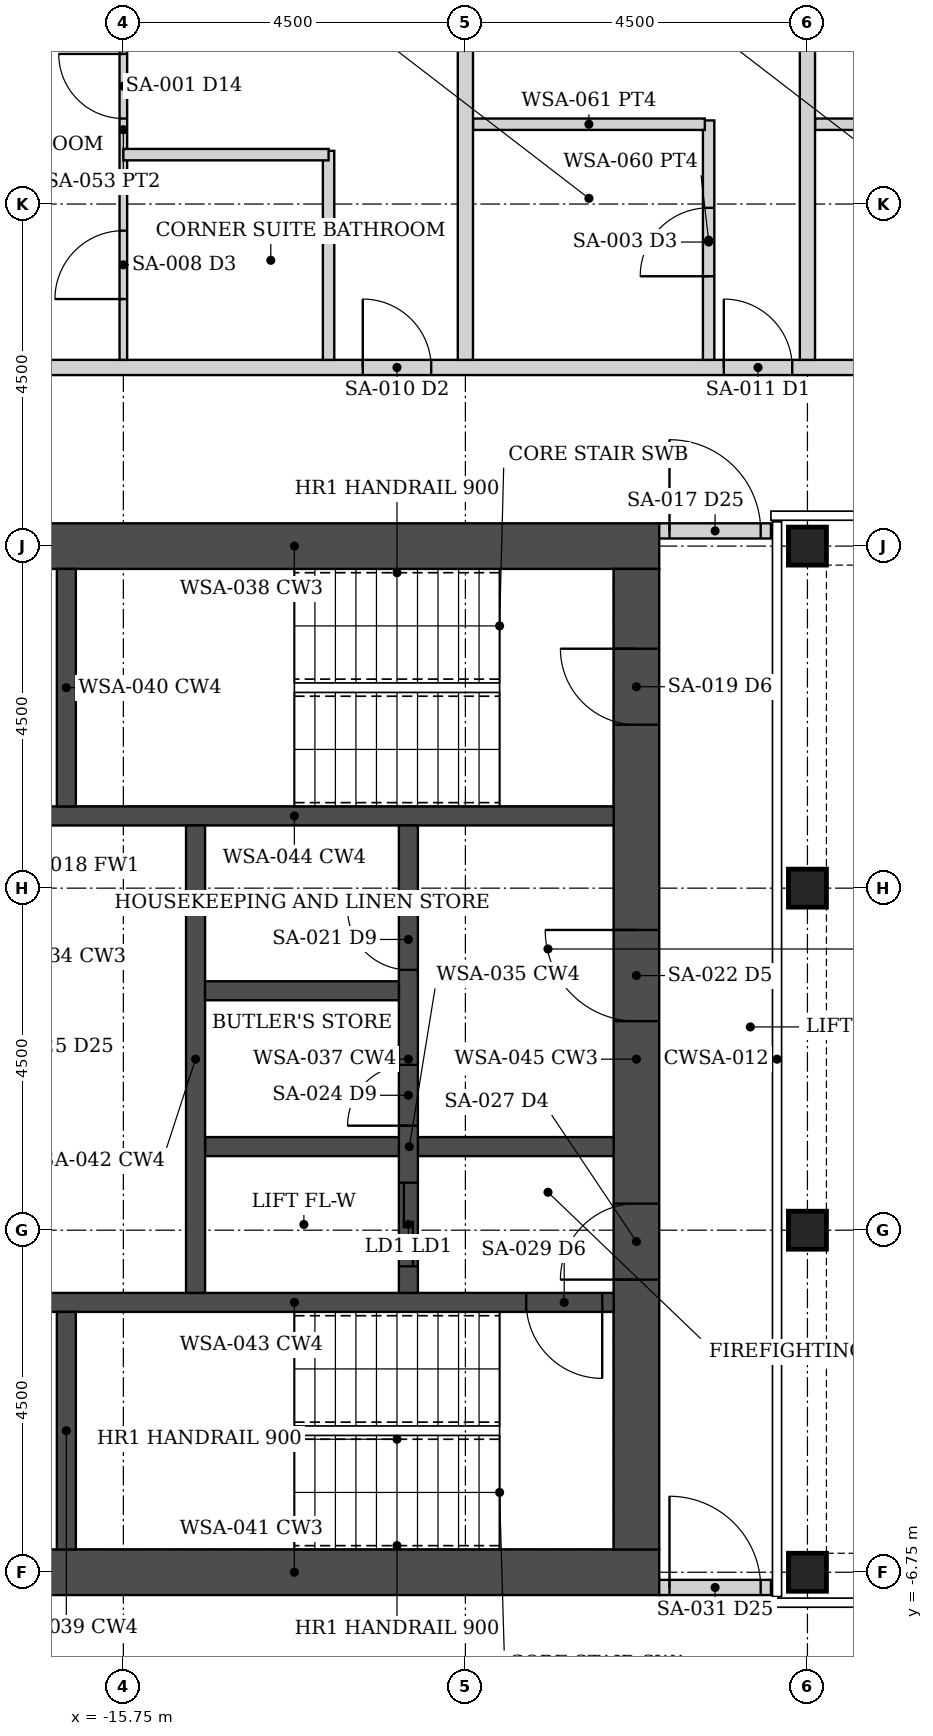
"""IFC4 building model, lengths in metres.
Left out: names, types, materials, properties, quantities, classifications, styles, units other than length and angle.
Written with IfcOpenShell. Run it as: python <this file> out.ifc"""

import sys

from ifc_helpers import new_model, si_unit, direction, frame, frame_2d, origin, origin_2d, place, context, subcontext, project, spatial, rectangle, hollow_rectangle, extrude, element, fill, save


model = new_model("IFC4")
c1 = context("Model", 3, precision=1e-05, world=origin(), true_north=direction((0.0, 1.0)))
c2 = subcontext(c1, "Body", "Model", "MODEL_VIEW")
j1 = project(units=[si_unit("LENGTHUNIT", "METRE"), si_unit("PLANEANGLEUNIT", "RADIAN")], contexts=[c1])
p1 = place(None, origin())
s1 = spatial("IfcSite", under=j1, at=p1, CompositionType="ELEMENT")
p2 = place(p1, origin())
s2 = spatial("IfcBuilding", under=s1, at=p2, CompositionType="ELEMENT")
p3 = place(p2, frame((0.0, 0.0, 200.8)))
s3 = spatial("IfcBuildingStorey", under=s2, at=p3, CompositionType="ELEMENT", Elevation=200.8)
for number, where, z_axis, x_axis in (
    (1, (-6.75, -6.75, 0.0), (0.0, 0.0, 1.0), (1.0, 0.0, 0.0)),
    (2, (-6.75, -2.25, 0.0), (0.0, 0.0, 1.0), (1.0, 0.0, 0.0)),
    (3, (-6.75, 2.25, 0.0), (0.0, 0.0, 1.0), (1.0, 0.0, 0.0)),
    (4, (-6.75, 6.75, 0.0), (0.0, 0.0, 1.0), (1.0, 0.0, 0.0)),
):
    element("IfcColumn", number, at=place(p3, frame(where, z_axis=z_axis, x_axis=x_axis)), inside=s3, PredefinedType="COLUMN", context=c2, shape_type="SweptSolid", body=[
        extrude(hollow_rectangle(XDim=0.5, YDim=0.5, WallThickness=0.03, at=origin_2d()), origin(), (0.0, 0.0, 1.0), 3.75),
    ])
for number, where, z_axis, x_axis in (
    (5, (-8.7, -6.75, 0.0), (0.0, 0.0, 1.0), (-1.0, 0.0, 0.0)),
    (6, (-8.7, 6.75, 0.0), (0.0, 0.0, 1.0), (-1.0, 0.0, 0.0)),
):
    element("IfcWall", number, at=place(p3, frame(where, z_axis=z_axis, x_axis=x_axis)), inside=s3, PredefinedType="SHEAR", context=c2, shape_type="SweptSolid", body=[
        extrude(rectangle(XDim=9.6, YDim=0.6, at=frame_2d((4.8, 0.0))), origin(), (0.0, 0.0, 1.0), 3.75),
    ])
p4 = place(p3, frame((-9.0, -6.45, 0.0), z_axis=(0.0, 0.0, 1.0), x_axis=(0.0, 1.0, 0.0)))
e7 = element("IfcWall", 7, at=p4, inside=s3, PredefinedType="SHEAR", context=c2, shape_type="SweptSolid", body=[
    extrude(rectangle(XDim=12.9, YDim=0.6, at=frame_2d((6.45, 0.0))), origin(), (0.0, 0.0, 1.0), 3.75),
])
p5 = place(p4, frame((3.55, 0.0, 0.0)))
e8 = element("IfcOpeningElement", 8, at=p5, cuts=e7, PredefinedType="OPENING", context=c2, shape_type="SweptSolid", body=[
    extrude(rectangle(XDim=1.0, YDim=2.1, at=frame_2d((0.5, 1.05))), frame((0.0, 0.31, 0.0), z_axis=(0.0, -1.0, 0.0), x_axis=(1.0, 0.0, 0.0)), (0.0, 0.0, 1.0), 0.62),
])
p6 = place(p4, frame((6.95, 0.0, 0.0)))
e9 = element("IfcOpeningElement", 9, at=p6, cuts=e7, PredefinedType="OPENING", context=c2, shape_type="SweptSolid", body=[
    extrude(rectangle(XDim=1.2, YDim=2.1, at=frame_2d((0.6, 1.05))), frame((0.0, 0.31, 0.0), z_axis=(0.0, -1.0, 0.0), x_axis=(1.0, 0.0, 0.0)), (0.0, 0.0, 1.0), 0.62),
])
p7 = place(p4, frame((10.85, 0.0, 0.0)))
e10 = element("IfcOpeningElement", 10, at=p7, cuts=e7, PredefinedType="OPENING", context=c2, shape_type="SweptSolid", body=[
    extrude(rectangle(XDim=1.0, YDim=2.1, at=frame_2d((0.5, 1.05))), frame((0.0, 0.31, 0.0), z_axis=(0.0, -1.0, 0.0), x_axis=(1.0, 0.0, 0.0)), (0.0, 0.0, 1.0), 0.62),
])
p8 = place(p3, frame((-9.3, -3.2, 0.0), z_axis=(0.0, 0.0, 1.0), x_axis=(-1.0, 0.0, 0.0)))
e11 = element("IfcWall", 11, at=p8, inside=s3, PredefinedType="SHEAR", context=c2, shape_type="SweptSolid", body=[
    extrude(rectangle(XDim=8.4, YDim=0.25, at=frame_2d((4.2, 0.0))), origin(), (0.0, 0.0, 1.0), 3.75),
])
p9 = place(p8, frame((0.15, 0.0, 0.0)))
e12 = element("IfcOpeningElement", 12, at=p9, cuts=e11, PredefinedType="OPENING", context=c2, shape_type="SweptSolid", body=[
    extrude(rectangle(XDim=1.0, YDim=2.1, at=frame_2d((0.5, 1.05))), frame((0.0, 0.135, 0.0), z_axis=(0.0, -1.0, 0.0), x_axis=(1.0, 0.0, 0.0)), (0.0, 0.0, 1.0), 0.27),
])
p10 = place(p3, frame((-9.3, 3.2, 0.0), z_axis=(0.0, 0.0, 1.0), x_axis=(-1.0, 0.0, 0.0)))
e13 = element("IfcWall", 13, at=p10, inside=s3, PredefinedType="SHEAR", context=c2, shape_type="SweptSolid", body=[
    extrude(rectangle(XDim=8.4, YDim=0.25, at=frame_2d((4.2, 0.0))), origin(), (0.0, 0.0, 1.0), 3.75),
])
for number, where, z_axis, x_axis in (
    (14, (-16.5, -6.45, 0.0), (0.0, 0.0, 1.0), (0.0, 1.0, 0.0)),
    (15, (-16.5, 3.325, 0.0), (0.0, 0.0, 1.0), (0.0, 1.0, 0.0)),
):
    element("IfcWall", number, at=place(p3, frame(where, z_axis=z_axis, x_axis=x_axis)), inside=s3, PredefinedType="SHEAR", context=c2, shape_type="SweptSolid", body=[
        extrude(rectangle(XDim=3.125, YDim=0.25, at=frame_2d((1.562, 0.0))), origin(), (0.0, 0.0, 1.0), 3.75),
    ])
p11 = place(p3, frame((-9.3, -1.15, 0.0), z_axis=(0.0, 0.0, 1.0), x_axis=(-1.0, 0.0, 0.0)))
e16 = element("IfcWall", 16, at=p11, inside=s3, PredefinedType="SHEAR", context=c2, shape_type="SweptSolid", body=[
    extrude(rectangle(XDim=5.375, YDim=0.25, at=frame_2d((2.688, 0.0))), origin(), (0.0, 0.0, 1.0), 3.75),
])
p12 = place(p3, frame((-12.0, -3.075, 0.0), z_axis=(0.0, 0.0, 1.0), x_axis=(0.0, 1.0, 0.0)))
e17 = element("IfcWall", 17, at=p12, inside=s3, PredefinedType="SHEAR", context=c2, shape_type="SweptSolid", body=[
    extrude(rectangle(XDim=6.15, YDim=0.25, at=frame_2d((3.075, 0.0))), origin(), (0.0, 0.0, 1.0), 3.75),
])
p13 = place(p12, frame((2.2, 0.0, 0.0)))
e18 = element("IfcOpeningElement", 18, at=p13, cuts=e17, PredefinedType="OPENING", context=c2, shape_type="SweptSolid", body=[
    extrude(rectangle(XDim=0.8, YDim=2.1, at=frame_2d((0.4, 1.05))), frame((0.0, 0.135, 0.0), z_axis=(0.0, -1.0, 0.0), x_axis=(1.0, 0.0, 0.0)), (0.0, 0.0, 1.0), 0.27),
])
p14 = place(p12, frame((4.25, 0.0, 0.0)))
e19 = element("IfcOpeningElement", 19, at=p14, cuts=e17, PredefinedType="OPENING", context=c2, shape_type="SweptSolid", body=[
    extrude(rectangle(XDim=0.8, YDim=2.1, at=frame_2d((0.4, 1.05))), frame((0.0, 0.135, 0.0), z_axis=(0.0, -1.0, 0.0), x_axis=(1.0, 0.0, 0.0)), (0.0, 0.0, 1.0), 0.27),
])
p15 = place(p12, frame((0.35, 0.0, 0.0)))
e20 = element("IfcOpeningElement", 20, at=p15, cuts=e17, PredefinedType="OPENING", context=c2, shape_type="SweptSolid", body=[
    extrude(rectangle(XDim=1.1, YDim=2.1, at=frame_2d((0.55, 1.05))), frame((0.0, 0.135, 0.0), z_axis=(0.0, -1.0, 0.0), x_axis=(1.0, 0.0, 0.0)), (0.0, 0.0, 1.0), 0.27),
])
p16 = place(p3, frame((-14.8, -3.075, 0.0), z_axis=(0.0, 0.0, 1.0), x_axis=(0.0, 1.0, 0.0)))
e21 = element("IfcWall", 21, at=p16, inside=s3, PredefinedType="SHEAR", context=c2, shape_type="SweptSolid", body=[
    extrude(rectangle(XDim=6.15, YDim=0.25, at=frame_2d((3.075, 0.0))), origin(), (0.0, 0.0, 1.0), 3.75),
])
p17 = place(p3, frame((-12.125, 0.9, 0.0), z_axis=(0.0, 0.0, 1.0), x_axis=(-1.0, 0.0, 0.0)))
e22 = element("IfcWall", 22, at=p17, inside=s3, PredefinedType="SHEAR", context=c2, shape_type="SweptSolid", body=[
    extrude(rectangle(XDim=2.55, YDim=0.25, at=frame_2d((1.275, 0.0))), origin(), (0.0, 0.0, 1.0), 3.75),
])
p18 = place(p3, frame((-8.7, 6.95, 0.0), z_axis=(0.0, 0.0, 1.0), x_axis=(1.0, 0.0, 0.0)))
e23 = element("IfcWall", 23, at=p18, inside=s3, PredefinedType="PARTITIONING", context=c2, shape_type="SweptSolid", body=[
    extrude(rectangle(XDim=1.47, YDim=0.2, at=frame_2d((0.735, 0.0))), origin(), (0.0, 0.0, 1.0), 2.629),
])
p19 = place(p18, frame((0.135, 0.0, 0.0)))
e24 = element("IfcOpeningElement", 24, at=p19, cuts=e23, PredefinedType="OPENING", context=c2, shape_type="SweptSolid", body=[
    extrude(rectangle(XDim=1.2, YDim=2.1, at=frame_2d((0.6, 1.05))), frame((0.0, 0.11, 0.0), z_axis=(0.0, -1.0, 0.0), x_axis=(1.0, 0.0, 0.0)), (0.0, 0.0, 1.0), 0.22),
])
p20 = place(p3, frame((-8.7, -6.95, 0.0), z_axis=(0.0, 0.0, 1.0), x_axis=(1.0, 0.0, 0.0)))
e25 = element("IfcWall", 25, at=p20, inside=s3, PredefinedType="PARTITIONING", context=c2, shape_type="SweptSolid", body=[
    extrude(rectangle(XDim=1.47, YDim=0.2, at=frame_2d((0.735, 0.0))), origin(), (0.0, 0.0, 1.0), 2.629),
])
p21 = place(p20, frame((0.135, 0.0, 0.0)))
e26 = element("IfcOpeningElement", 26, at=p21, cuts=e25, PredefinedType="OPENING", context=c2, shape_type="SweptSolid", body=[
    extrude(rectangle(XDim=1.2, YDim=2.1, at=frame_2d((0.6, 1.05))), frame((0.0, 0.11, 0.0), z_axis=(0.0, -1.0, 0.0), x_axis=(1.0, 0.0, 0.0)), (0.0, 0.0, 1.0), 0.22),
])
p22 = place(p3, frame((-20.05, 9.1, 0.0), z_axis=(0.0, 0.0, 1.0), x_axis=(1.0, 0.0, 0.0)))
e27 = element("IfcWall", 27, at=p22, inside=s3, PredefinedType="PARTITIONING", context=c2, shape_type="SweptSolid", body=[
    extrude(rectangle(XDim=40.1, YDim=0.2, at=frame_2d((20.05, 0.0))), origin(), (0.0, 0.0, 1.0), 2.629),
])
p23 = place(p22, frame((12.2, 0.0, 0.0)))
e28 = element("IfcOpeningElement", 28, at=p23, cuts=e27, PredefinedType="OPENING", context=c2, shape_type="SweptSolid", body=[
    extrude(rectangle(XDim=0.9, YDim=2.1, at=frame_2d((0.45, 1.05))), frame((0.0, 0.11, 0.0), z_axis=(0.0, -1.0, 0.0), x_axis=(1.0, 0.0, 0.0)), (0.0, 0.0, 1.0), 0.22),
])
p24 = place(p22, frame((16.7, 0.0, 0.0)))
e29 = element("IfcOpeningElement", 29, at=p24, cuts=e27, PredefinedType="OPENING", context=c2, shape_type="SweptSolid", body=[
    extrude(rectangle(XDim=0.9, YDim=2.1, at=frame_2d((0.45, 1.05))), frame((0.0, 0.11, 0.0), z_axis=(0.0, -1.0, 0.0), x_axis=(1.0, 0.0, 0.0)), (0.0, 0.0, 1.0), 0.22),
])
p25 = place(p22, frame((21.2, 0.0, 0.0)))
e30 = element("IfcOpeningElement", 30, at=p25, cuts=e27, PredefinedType="OPENING", context=c2, shape_type="SweptSolid", body=[
    extrude(rectangle(XDim=0.9, YDim=2.1, at=frame_2d((0.45, 1.05))), frame((0.0, 0.11, 0.0), z_axis=(0.0, -1.0, 0.0), x_axis=(1.0, 0.0, 0.0)), (0.0, 0.0, 1.0), 0.22),
])
p26 = place(p22, frame((25.7, 0.0, 0.0)))
e31 = element("IfcOpeningElement", 31, at=p26, cuts=e27, PredefinedType="OPENING", context=c2, shape_type="SweptSolid", body=[
    extrude(rectangle(XDim=0.9, YDim=2.1, at=frame_2d((0.45, 1.05))), frame((0.0, 0.11, 0.0), z_axis=(0.0, -1.0, 0.0), x_axis=(1.0, 0.0, 0.0)), (0.0, 0.0, 1.0), 0.22),
])
p27 = place(p22, frame((30.2, 0.0, 0.0)))
e32 = element("IfcOpeningElement", 32, at=p27, cuts=e27, PredefinedType="OPENING", context=c2, shape_type="SweptSolid", body=[
    extrude(rectangle(XDim=0.9, YDim=2.1, at=frame_2d((0.45, 1.05))), frame((0.0, 0.11, 0.0), z_axis=(0.0, -1.0, 0.0), x_axis=(1.0, 0.0, 0.0)), (0.0, 0.0, 1.0), 0.22),
])
p28 = place(p22, frame((31.75, 0.0, 0.0)))
e33 = element("IfcOpeningElement", 33, at=p28, cuts=e27, PredefinedType="OPENING", context=c2, shape_type="SweptSolid", body=[
    extrude(rectangle(XDim=0.9, YDim=2.1, at=frame_2d((0.45, 1.05))), frame((0.0, 0.11, 0.0), z_axis=(0.0, -1.0, 0.0), x_axis=(1.0, 0.0, 0.0)), (0.0, 0.0, 1.0), 0.22),
])
p29 = place(p22, frame((7.45, 0.0, 0.0)))
e34 = element("IfcOpeningElement", 34, at=p29, cuts=e27, PredefinedType="OPENING", context=c2, shape_type="SweptSolid", body=[
    extrude(rectangle(XDim=0.9, YDim=2.1, at=frame_2d((0.45, 1.05))), frame((0.0, 0.11, 0.0), z_axis=(0.0, -1.0, 0.0), x_axis=(1.0, 0.0, 0.0)), (0.0, 0.0, 1.0), 0.22),
])
p30 = place(p3, frame((-8.05, 9.2, 0.0), z_axis=(0.0, 0.0, 1.0), x_axis=(0.0, 1.0, 0.0)))
e35 = element("IfcWall", 35, at=p30, inside=s3, PredefinedType="PARTITIONING", context=c2, shape_type="SweptSolid", body=[
    extrude(rectangle(XDim=3.15, YDim=0.15, at=frame_2d((1.575, 0.0))), origin(), (0.0, 0.0, 1.0), 2.629),
])
p31 = place(p30, frame((1.1, 0.0, 0.0)))
e36 = element("IfcOpeningElement", 36, at=p31, cuts=e35, PredefinedType="OPENING", context=c2, shape_type="SweptSolid", body=[
    extrude(rectangle(XDim=0.9, YDim=2.1, at=frame_2d((0.45, 1.05))), frame((0.0, 0.085, 0.0), z_axis=(0.0, -1.0, 0.0), x_axis=(1.0, 0.0, 0.0)), (0.0, 0.0, 1.0), 0.17),
])
for number, where, z_axis, x_axis in (
    (37, (-11.15, 12.3, 0.0), (0.0, 0.0, 1.0), (1.0, 0.0, 0.0)),
    (38, (-6.65, 12.3, 0.0), (0.0, 0.0, 1.0), (1.0, 0.0, 0.0)),
):
    element("IfcWall", number, at=place(p3, frame(where, z_axis=z_axis, x_axis=x_axis)), inside=s3, PredefinedType="PARTITIONING", context=c2, shape_type="SweptSolid", body=[
        extrude(rectangle(XDim=3.05, YDim=0.15, at=frame_2d((1.525, 0.0))), origin(), (0.0, 0.0, 1.0), 2.629),
    ])
for number, where, z_axis, x_axis in (
    (39, (-11.25, 9.2, 0.0), (0.0, 0.0, 1.0), (0.0, 1.0, 0.0)),
    (40, (-6.75, 9.2, 0.0), (0.0, 0.0, 1.0), (0.0, 1.0, 0.0)),
):
    element("IfcWall", number, at=place(p3, frame(where, z_axis=z_axis, x_axis=x_axis)), inside=s3, PredefinedType="PARTITIONING", context=c2, shape_type="SweptSolid", body=[
        extrude(rectangle(XDim=10.7, YDim=0.2, at=frame_2d((5.35, 0.0))), origin(), (0.0, 0.0, 1.0), 2.629),
    ])
p32 = place(p3, frame((-15.75, 9.2, 0.0), z_axis=(0.0, 0.0, 1.0), x_axis=(0.0, 1.0, 0.0)))
e41 = element("IfcWall", 41, at=p32, inside=s3, PredefinedType="PARTITIONING", context=c2, shape_type="SweptSolid", body=[
    extrude(rectangle(XDim=6.055, YDim=0.1, at=frame_2d((3.027, 0.0))), origin(), (0.0, 0.0, 1.0), 2.629),
])
p33 = place(p32, frame((3.175, 0.0, 0.0)))
e42 = element("IfcOpeningElement", 42, at=p33, cuts=e41, PredefinedType="OPENING", context=c2, shape_type="SweptSolid", body=[
    extrude(rectangle(XDim=0.85, YDim=2.1, at=frame_2d((0.425, 1.05))), frame((0.0, 0.06, 0.0), z_axis=(0.0, -1.0, 0.0), x_axis=(1.0, 0.0, 0.0)), (0.0, 0.0, 1.0), 0.12),
])
p34 = place(p32, frame((0.8, 0.0, 0.0)))
e43 = element("IfcOpeningElement", 43, at=p34, cuts=e41, PredefinedType="OPENING", context=c2, shape_type="SweptSolid", body=[
    extrude(rectangle(XDim=0.9, YDim=2.1, at=frame_2d((0.45, 1.05))), frame((0.0, 0.06, 0.0), z_axis=(0.0, -1.0, 0.0), x_axis=(1.0, 0.0, 0.0)), (0.0, 0.0, 1.0), 0.12),
])
p35 = place(p3, frame((-13.05, 9.2, 0.0), z_axis=(0.0, 0.0, 1.0), x_axis=(0.0, 1.0, 0.0)))
e44 = element("IfcWall", 44, at=p35, inside=s3, PredefinedType="PARTITIONING", context=c2, shape_type="SweptSolid", body=[
    extrude(rectangle(XDim=2.75, YDim=0.15, at=frame_2d((1.375, 0.0))), origin(), (0.0, 0.0, 1.0), 2.629),
])
p36 = place(p3, frame((-15.75, 11.9, 0.0), z_axis=(0.0, 0.0, 1.0), x_axis=(1.0, 0.0, 0.0)))
e45 = element("IfcWall", 45, at=p36, inside=s3, PredefinedType="PARTITIONING", context=c2, shape_type="SweptSolid", body=[
    extrude(rectangle(XDim=2.7, YDim=0.15, at=frame_2d((1.35, 0.0))), origin(), (0.0, 0.0, 1.0), 2.629),
])
p37 = place(p19, origin())
e46 = element("IfcDoor", 46, at=p37, inside=s3, OperationType="DOUBLE_DOOR_DOUBLE_SWING", PredefinedType="DOOR", context=c2, shape_type="SweptSolid", body=[
    extrude(rectangle(XDim=1.2, YDim=2.1, at=frame_2d((0.6, 1.05))), frame((0.0, 0.025, 0.0), z_axis=(0.0, -1.0, 0.0), x_axis=(1.0, 0.0, 0.0)), (0.0, 0.0, 1.0), 0.05),
])
fill(e24, e46)
p38 = place(p21, origin())
e47 = element("IfcDoor", 47, at=p38, inside=s3, OperationType="DOUBLE_DOOR_DOUBLE_SWING", PredefinedType="DOOR", context=c2, shape_type="SweptSolid", body=[
    extrude(rectangle(XDim=1.2, YDim=2.1, at=frame_2d((0.6, 1.05))), frame((0.0, 0.025, 0.0), z_axis=(0.0, -1.0, 0.0), x_axis=(1.0, 0.0, 0.0)), (0.0, 0.0, 1.0), 0.05),
])
fill(e26, e47)
p39 = place(p23, origin())
e48 = element("IfcDoor", 48, at=p39, inside=s3, OperationType="SINGLE_SWING_LEFT", PredefinedType="DOOR", context=c2, shape_type="SweptSolid", body=[
    extrude(rectangle(XDim=0.9, YDim=2.1, at=frame_2d((0.45, 1.05))), frame((0.0, 0.025, 0.0), z_axis=(0.0, -1.0, 0.0), x_axis=(1.0, 0.0, 0.0)), (0.0, 0.0, 1.0), 0.05),
])
fill(e28, e48)
p40 = place(p31, origin())
e49 = element("IfcDoor", 49, at=p40, inside=s3, OperationType="SINGLE_SWING_LEFT", PredefinedType="DOOR", context=c2, shape_type="SweptSolid", body=[
    extrude(rectangle(XDim=0.9, YDim=2.1, at=frame_2d((0.45, 1.05))), frame((0.0, 0.025, 0.0), z_axis=(0.0, -1.0, 0.0), x_axis=(1.0, 0.0, 0.0)), (0.0, 0.0, 1.0), 0.05),
])
fill(e36, e49)
p41 = place(p29, origin())
e50 = element("IfcDoor", 50, at=p41, inside=s3, OperationType="SINGLE_SWING_LEFT", PredefinedType="DOOR", context=c2, shape_type="SweptSolid", body=[
    extrude(rectangle(XDim=0.9, YDim=2.1, at=frame_2d((0.45, 1.05))), frame((0.0, 0.025, 0.0), z_axis=(0.0, -1.0, 0.0), x_axis=(1.0, 0.0, 0.0)), (0.0, 0.0, 1.0), 0.05),
])
fill(e34, e50)
p42 = place(p33, origin())
e51 = element("IfcDoor", 51, at=p42, inside=s3, OperationType="SINGLE_SWING_RIGHT", PredefinedType="DOOR", context=c2, shape_type="SweptSolid", body=[
    extrude(rectangle(XDim=0.85, YDim=2.1, at=frame_2d((0.425, 1.05))), frame((0.0, 0.025, 0.0), z_axis=(0.0, -1.0, 0.0), x_axis=(1.0, 0.0, 0.0)), (0.0, 0.0, 1.0), 0.05),
])
fill(e42, e51)
p43 = place(p34, origin())
e52 = element("IfcDoor", 52, at=p43, inside=s3, OperationType="SINGLE_SWING_LEFT", PredefinedType="DOOR", context=c2, shape_type="SweptSolid", body=[
    extrude(rectangle(XDim=0.9, YDim=2.1, at=frame_2d((0.45, 1.05))), frame((0.0, 0.025, 0.0), z_axis=(0.0, -1.0, 0.0), x_axis=(1.0, 0.0, 0.0)), (0.0, 0.0, 1.0), 0.05),
])
fill(e43, e52)
p44 = place(p5, origin())
e53 = element("IfcDoor", 53, at=p44, inside=s3, OperationType="SINGLE_SWING_LEFT", PredefinedType="DOOR", context=c2, shape_type="SweptSolid", body=[
    extrude(rectangle(XDim=1.0, YDim=2.1, at=frame_2d((0.5, 1.05))), frame((0.0, 0.025, 0.0), z_axis=(0.0, -1.0, 0.0), x_axis=(1.0, 0.0, 0.0)), (0.0, 0.0, 1.0), 0.05),
])
fill(e8, e53)
p45 = place(p9, origin())
e54 = element("IfcDoor", 54, at=p45, inside=s3, OperationType="SINGLE_SWING_LEFT", PredefinedType="DOOR", context=c2, shape_type="SweptSolid", body=[
    extrude(rectangle(XDim=1.0, YDim=2.1, at=frame_2d((0.5, 1.05))), frame((0.0, 0.025, 0.0), z_axis=(0.0, -1.0, 0.0), x_axis=(1.0, 0.0, 0.0)), (0.0, 0.0, 1.0), 0.05),
])
fill(e12, e54)
p46 = place(p6, origin())
e55 = element("IfcDoor", 55, at=p46, inside=s3, OperationType="SINGLE_SWING_RIGHT", PredefinedType="DOOR", context=c2, shape_type="SweptSolid", body=[
    extrude(rectangle(XDim=1.2, YDim=2.1, at=frame_2d((0.6, 1.05))), frame((0.0, 0.025, 0.0), z_axis=(0.0, -1.0, 0.0), x_axis=(1.0, 0.0, 0.0)), (0.0, 0.0, 1.0), 0.05),
])
fill(e9, e55)
p47 = place(p13, origin())
e56 = element("IfcDoor", 56, at=p47, inside=s3, OperationType="SINGLE_SWING_LEFT", PredefinedType="DOOR", context=c2, shape_type="SweptSolid", body=[
    extrude(rectangle(XDim=0.8, YDim=2.1, at=frame_2d((0.4, 1.05))), frame((0.0, 0.025, 0.0), z_axis=(0.0, -1.0, 0.0), x_axis=(1.0, 0.0, 0.0)), (0.0, 0.0, 1.0), 0.05),
])
fill(e18, e56)
p48 = place(p14, origin())
e57 = element("IfcDoor", 57, at=p48, inside=s3, OperationType="SINGLE_SWING_RIGHT", PredefinedType="DOOR", context=c2, shape_type="SweptSolid", body=[
    extrude(rectangle(XDim=0.8, YDim=2.1, at=frame_2d((0.4, 1.05))), frame((0.0, 0.025, 0.0), z_axis=(0.0, -1.0, 0.0), x_axis=(1.0, 0.0, 0.0)), (0.0, 0.0, 1.0), 0.05),
])
fill(e19, e57)
p49 = place(p7, origin())
e58 = element("IfcDoor", 58, at=p49, inside=s3, OperationType="SINGLE_SWING_RIGHT", PredefinedType="DOOR", context=c2, shape_type="SweptSolid", body=[
    extrude(rectangle(XDim=1.0, YDim=2.1, at=frame_2d((0.5, 1.05))), frame((0.0, 0.025, 0.0), z_axis=(0.0, -1.0, 0.0), x_axis=(1.0, 0.0, 0.0)), (0.0, 0.0, 1.0), 0.05),
])
fill(e10, e58)
p50 = place(p15, origin())
e59 = element("IfcDoor", 59, at=p50, inside=s3, OperationType="DOUBLE_DOOR_SLIDING", PredefinedType="DOOR", context=c2, shape_type="SweptSolid", body=[
    extrude(rectangle(XDim=1.1, YDim=2.1, at=frame_2d((0.55, 1.05))), frame((0.0, 0.025, 0.0), z_axis=(0.0, -1.0, 0.0), x_axis=(1.0, 0.0, 0.0)), (0.0, 0.0, 1.0), 0.05),
])
fill(e20, e59)
save(model, sys.argv[1])
